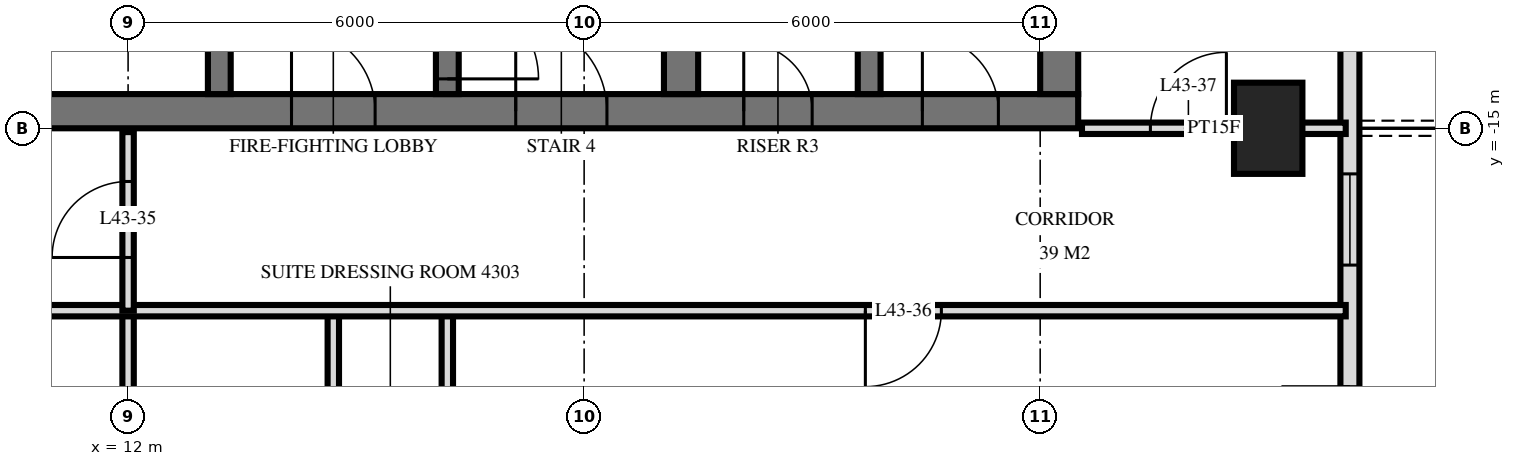
"""IFC4 building model, lengths in metres.
Left out: names, types, materials, properties, quantities, classifications, styles, units other than length and angle.
Written with IfcOpenShell. Run it as: python <this file> out.ifc"""

import sys

from ifc_helpers import new_model, si_unit, direction, frame, frame_2d, origin, origin_2d, place, context, subcontext, project, spatial, rectangle, extrude, element, fill, save


model = new_model("IFC4")
c1 = context("Model", 3, precision=1e-05, world=origin(), true_north=direction((0.0, 1.0)))
c2 = subcontext(c1, "Body", "Model", "MODEL_VIEW")
j1 = project(units=[si_unit("LENGTHUNIT", "METRE"), si_unit("PLANEANGLEUNIT", "RADIAN")], contexts=[c1])
p1 = place(None, origin())
s1 = spatial("IfcSite", under=j1, at=p1, CompositionType="ELEMENT")
p2 = place(p1, origin())
s2 = spatial("IfcBuilding", under=s1, at=p2, CompositionType="ELEMENT")
p3 = place(p2, frame((0.0, 0.0, 166.8)))
s3 = spatial("IfcBuildingStorey", under=s2, at=p3, CompositionType="ELEMENT", Elevation=166.8)
p4 = place(p3, frame((27.0, -15.0, 0.0), z_axis=(0.0, 0.0, 1.0), x_axis=(0.0, 1.0, 0.0)))
e1 = element("IfcColumn", 1, at=p4, inside=s3, PredefinedType="COLUMN", context=c2, shape_type="SweptSolid", body=[
    extrude(rectangle(XDim=1.2, YDim=0.9, at=origin_2d()), origin(), (0.0, 0.0, 1.0), 3.6),
])
p5 = place(p3, frame((10.0, -14.775, 0.0), z_axis=(0.0, 0.0, 1.0), x_axis=(1.0, 0.0, 0.0)))
e2 = element("IfcWall", 2, at=p5, inside=s3, PredefinedType="SHEAR", context=c2, shape_type="SweptSolid", body=[
    extrude(rectangle(XDim=14.5, YDim=0.45, at=frame_2d((7.25, 0.0))), origin(), (0.0, 0.0, 1.0), 3.6),
])
p6 = place(p5, frame((7.1, 0.0, 0.0)))
e3 = element("IfcOpeningElement", 3, at=p6, cuts=e2, PredefinedType="OPENING", context=c2, shape_type="SweptSolid", body=[
    extrude(rectangle(XDim=1.2, YDim=2.1, at=frame_2d((0.6, 1.05))), frame((0.0, 0.235, 0.0), z_axis=(0.0, -1.0, 0.0), x_axis=(1.0, 0.0, 0.0)), (0.0, 0.0, 1.0), 0.47),
])
p7 = place(p5, frame((4.15, 0.0, 0.0)))
e4 = element("IfcOpeningElement", 4, at=p7, cuts=e2, PredefinedType="OPENING", context=c2, shape_type="SweptSolid", body=[
    extrude(rectangle(XDim=1.1, YDim=2.1, at=frame_2d((0.55, 1.05))), frame((0.0, 0.235, 0.0), z_axis=(0.0, -1.0, 0.0), x_axis=(1.0, 0.0, 0.0)), (0.0, 0.0, 1.0), 0.47),
])
p8 = place(p5, frame((10.1, 0.0, 0.0)))
e5 = element("IfcOpeningElement", 5, at=p8, cuts=e2, PredefinedType="OPENING", context=c2, shape_type="SweptSolid", body=[
    extrude(rectangle(XDim=0.9, YDim=2.1, at=frame_2d((0.45, 1.05))), frame((0.0, 0.235, 0.0), z_axis=(0.0, -1.0, 0.0), x_axis=(1.0, 0.0, 0.0)), (0.0, 0.0, 1.0), 0.47),
])
p9 = place(p5, frame((12.45, 0.0, 0.0)))
e6 = element("IfcOpeningElement", 6, at=p9, cuts=e2, PredefinedType="OPENING", context=c2, shape_type="SweptSolid", body=[
    extrude(rectangle(XDim=1.0, YDim=2.1, at=frame_2d((0.5, 1.05))), frame((0.0, 0.235, 0.0), z_axis=(0.0, -1.0, 0.0), x_axis=(1.0, 0.0, 0.0)), (0.0, 0.0, 1.0), 0.47),
])
p10 = place(p3, frame((24.25, -14.55, 0.0), z_axis=(0.0, 0.0, 1.0), x_axis=(0.0, 1.0, 0.0)))
e7 = element("IfcWall", 7, at=p10, inside=s3, PredefinedType="SHEAR", context=c2, shape_type="SweptSolid", body=[
    extrude(rectangle(XDim=14.1, YDim=0.5, at=frame_2d((7.05, 0.0))), origin(), (0.0, 0.0, 1.0), 3.6),
])
p11 = place(p3, frame((13.2, -14.55, 0.0), z_axis=(0.0, 0.0, 1.0), x_axis=(0.0, 1.0, 0.0)))
e8 = element("IfcWall", 8, at=p11, inside=s3, PredefinedType="SHEAR", context=c2, shape_type="SweptSolid", body=[
    extrude(rectangle(XDim=5.4, YDim=0.3, at=frame_2d((2.7, 0.0))), origin(), (0.0, 0.0, 1.0), 3.6),
])
p12 = place(p11, frame((4.0, 0.0, 0.0)))
e9 = element("IfcOpeningElement", 9, at=p12, cuts=e8, PredefinedType="OPENING", context=c2, shape_type="SweptSolid", body=[
    extrude(rectangle(XDim=1.2, YDim=2.1, at=frame_2d((0.6, 1.05))), frame((0.0, 0.16, 0.0), z_axis=(0.0, -1.0, 0.0), x_axis=(1.0, 0.0, 0.0)), (0.0, 0.0, 1.0), 0.32),
])
p13 = place(p3, frame((16.2, -14.55, 0.0), z_axis=(0.0, 0.0, 1.0), x_axis=(0.0, 1.0, 0.0)))
e10 = element("IfcWall", 10, at=p13, inside=s3, PredefinedType="SHEAR", context=c2, shape_type="SweptSolid", body=[
    extrude(rectangle(XDim=5.4, YDim=0.3, at=frame_2d((2.7, 0.0))), origin(), (0.0, 0.0, 1.0), 3.6),
])
p14 = place(p13, frame((0.2, 0.0, 0.0)))
e11 = element("IfcOpeningElement", 11, at=p14, cuts=e10, PredefinedType="OPENING", context=c2, shape_type="SweptSolid", body=[
    extrude(rectangle(XDim=1.2, YDim=2.1, at=frame_2d((0.6, 1.05))), frame((0.0, 0.16, 0.0), z_axis=(0.0, -1.0, 0.0), x_axis=(1.0, 0.0, 0.0)), (0.0, 0.0, 1.0), 0.32),
])
p15 = place(p3, frame((19.275, -14.55, 0.0), z_axis=(0.0, 0.0, 1.0), x_axis=(0.0, 1.0, 0.0)))
e12 = element("IfcWall", 12, at=p15, inside=s3, PredefinedType="SHEAR", context=c2, shape_type="SweptSolid", body=[
    extrude(rectangle(XDim=5.4, YDim=0.45, at=frame_2d((2.7, 0.0))), origin(), (0.0, 0.0, 1.0), 3.6),
])
p16 = place(p3, frame((21.75, -14.55, 0.0), z_axis=(0.0, 0.0, 1.0), x_axis=(0.0, 1.0, 0.0)))
e13 = element("IfcWall", 13, at=p16, inside=s3, PredefinedType="SHEAR", context=c2, shape_type="SweptSolid", body=[
    extrude(rectangle(XDim=5.4, YDim=0.3, at=frame_2d((2.7, 0.0))), origin(), (0.0, 0.0, 1.0), 3.6),
])
p17 = place(p3, frame((28.075, -29.275, 0.0), z_axis=(0.0, 0.0, 1.0), x_axis=(0.0, 1.0, 0.0)))
e14 = element("IfcWall", 14, at=p17, inside=s3, PredefinedType="SOLIDWALL", context=c2, shape_type="SweptSolid", body=[
    extrude(rectangle(XDim=25.951, YDim=0.25, at=frame_2d((12.975, 0.0))), origin(), (0.0, 0.0, 1.0), 3.32),
])
p18 = place(p17, frame((0.575, 0.0, 0.0)))
e15 = element("IfcOpeningElement", 15, at=p18, cuts=e14, PredefinedType="OPENING", context=c2, shape_type="SweptSolid", body=[
    extrude(rectangle(XDim=1.8, YDim=2.4, at=frame_2d((0.9, 1.2))), frame((0.0, 0.135, 0.0), z_axis=(0.0, -1.0, 0.0), x_axis=(1.0, 0.0, 0.0)), (0.0, 0.0, 1.0), 0.27),
])
p19 = place(p17, frame((3.325, 0.0, 0.3)))
e16 = element("IfcOpeningElement", 16, at=p19, cuts=e14, PredefinedType="OPENING", context=c2, shape_type="SweptSolid", body=[
    extrude(rectangle(XDim=1.8, YDim=2.1, at=frame_2d((0.9, 1.05))), frame((0.0, 0.135, 0.0), z_axis=(0.0, -1.0, 0.0), x_axis=(1.0, 0.0, 0.0)), (0.0, 0.0, 1.0), 0.27),
])
p20 = place(p17, frame((9.075, 0.0, 0.0)))
e17 = element("IfcOpeningElement", 17, at=p20, cuts=e14, PredefinedType="OPENING", context=c2, shape_type="SweptSolid", body=[
    extrude(rectangle(XDim=1.8, YDim=2.4, at=frame_2d((0.9, 1.2))), frame((0.0, 0.135, 0.0), z_axis=(0.0, -1.0, 0.0), x_axis=(1.0, 0.0, 0.0)), (0.0, 0.0, 1.0), 0.27),
])
p21 = place(p17, frame((12.475, 0.0, 0.3)))
e18 = element("IfcOpeningElement", 18, at=p21, cuts=e14, PredefinedType="OPENING", context=c2, shape_type="SweptSolid", body=[
    extrude(rectangle(XDim=1.2, YDim=2.1, at=frame_2d((0.6, 1.05))), frame((0.0, 0.135, 0.0), z_axis=(0.0, -1.0, 0.0), x_axis=(1.0, 0.0, 0.0)), (0.0, 0.0, 1.0), 0.27),
])
p22 = place(p17, frame((16.625, 0.0, 0.0)))
e19 = element("IfcOpeningElement", 19, at=p22, cuts=e14, PredefinedType="OPENING", context=c2, shape_type="SweptSolid", body=[
    extrude(rectangle(XDim=1.8, YDim=2.4, at=frame_2d((0.9, 1.2))), frame((0.0, 0.135, 0.0), z_axis=(0.0, -1.0, 0.0), x_axis=(1.0, 0.0, 0.0)), (0.0, 0.0, 1.0), 0.27),
])
p23 = place(p3, frame((16.2, -21.6, 0.0), z_axis=(0.0, 0.0, 1.0), x_axis=(0.0, 1.0, 0.0)))
e20 = element("IfcWall", 20, at=p23, inside=s3, PredefinedType="PARTITIONING", context=c2, shape_type="SweptSolid", body=[
    extrude(rectangle(XDim=4.2, YDim=0.15, at=frame_2d((2.1, 0.0))), origin(), (0.0, 0.0, 1.0), 3.32),
])
p24 = place(p23, frame((1.65, 0.0, 0.0)))
e21 = element("IfcOpeningElement", 21, at=p24, cuts=e20, PredefinedType="OPENING", context=c2, shape_type="SweptSolid", body=[
    extrude(rectangle(XDim=0.9, YDim=2.1, at=frame_2d((0.45, 1.05))), frame((0.0, 0.085, 0.0), z_axis=(0.0, -1.0, 0.0), x_axis=(1.0, 0.0, 0.0)), (0.0, 0.0, 1.0), 0.17),
])
p25 = place(p3, frame((14.7, -21.6, 0.0), z_axis=(0.0, 0.0, 1.0), x_axis=(0.0, 1.0, 0.0)))
e22 = element("IfcWall", 22, at=p25, inside=s3, PredefinedType="PARTITIONING", context=c2, shape_type="SweptSolid", body=[
    extrude(rectangle(XDim=4.2, YDim=0.15, at=frame_2d((2.1, 0.0))), origin(), (0.0, 0.0, 1.0), 3.32),
])
p26 = place(p3, frame((12.0, -17.4, 0.0), z_axis=(0.0, 0.0, 1.0), x_axis=(0.0, 1.0, 0.0)))
e23 = element("IfcWall", 23, at=p26, inside=s3, PredefinedType="PARTITIONING", context=c2, shape_type="SweptSolid", body=[
    extrude(rectangle(XDim=2.35, YDim=0.15, at=frame_2d((1.175, 0.0))), origin(), (0.0, 0.0, 1.0), 3.32),
])
p27 = place(p26, frame((0.7, 0.0, 0.0)))
e24 = element("IfcOpeningElement", 24, at=p27, cuts=e23, PredefinedType="OPENING", context=c2, shape_type="SweptSolid", body=[
    extrude(rectangle(XDim=1.0, YDim=2.1, at=frame_2d((0.5, 1.05))), frame((0.0, 0.085, 0.0), z_axis=(0.0, -1.0, 0.0), x_axis=(1.0, 0.0, 0.0)), (0.0, 0.0, 1.0), 0.17),
])
p28 = place(p3, frame((12.0, -33.62, 0.0), z_axis=(0.0, 0.0, 1.0), x_axis=(0.0, 1.0, 0.0)))
e25 = element("IfcWall", 25, at=p28, inside=s3, PredefinedType="PARTITIONING", context=c2, shape_type="SweptSolid", body=[
    extrude(rectangle(XDim=16.22, YDim=0.15, at=frame_2d((8.11, 0.0))), origin(), (0.0, 0.0, 1.0), 3.32),
])
p29 = place(p3, frame((-28.02, -17.4, 0.0), z_axis=(0.0, 0.0, 1.0), x_axis=(1.0, 0.0, 0.0)))
e26 = element("IfcWall", 26, at=p29, inside=s3, PredefinedType="PARTITIONING", context=c2, shape_type="SweptSolid", body=[
    extrude(rectangle(XDim=56.04, YDim=0.15, at=frame_2d((28.02, 0.0))), origin(), (0.0, 0.0, 1.0), 3.32),
])
p30 = place(p29, frame((10.42, 0.0, 0.0)))
e27 = element("IfcOpeningElement", 27, at=p30, cuts=e26, PredefinedType="OPENING", context=c2, shape_type="SweptSolid", body=[
    extrude(rectangle(XDim=1.0, YDim=2.1, at=frame_2d((0.5, 1.05))), frame((0.0, 0.085, 0.0), z_axis=(0.0, -1.0, 0.0), x_axis=(1.0, 0.0, 0.0)), (0.0, 0.0, 1.0), 0.17),
])
p31 = place(p29, frame((2.32, 0.0, 0.0)))
e28 = element("IfcOpeningElement", 28, at=p31, cuts=e26, PredefinedType="OPENING", context=c2, shape_type="SweptSolid", body=[
    extrude(rectangle(XDim=1.0, YDim=2.1, at=frame_2d((0.5, 1.05))), frame((0.0, 0.085, 0.0), z_axis=(0.0, -1.0, 0.0), x_axis=(1.0, 0.0, 0.0)), (0.0, 0.0, 1.0), 0.17),
])
p32 = place(p29, frame((49.72, 0.0, 0.0)))
e29 = element("IfcOpeningElement", 29, at=p32, cuts=e26, PredefinedType="OPENING", context=c2, shape_type="SweptSolid", body=[
    extrude(rectangle(XDim=1.0, YDim=2.1, at=frame_2d((0.5, 1.05))), frame((0.0, 0.085, 0.0), z_axis=(0.0, -1.0, 0.0), x_axis=(1.0, 0.0, 0.0)), (0.0, 0.0, 1.0), 0.17),
])
p33 = place(p29, frame((23.02, 0.0, 0.0)))
e30 = element("IfcOpeningElement", 30, at=p33, cuts=e26, PredefinedType="OPENING", context=c2, shape_type="SweptSolid", body=[
    extrude(rectangle(XDim=1.0, YDim=2.1, at=frame_2d((0.5, 1.05))), frame((0.0, 0.085, 0.0), z_axis=(0.0, -1.0, 0.0), x_axis=(1.0, 0.0, 0.0)), (0.0, 0.0, 1.0), 0.17),
])
p34 = place(p29, frame((35.02, 0.0, 0.0)))
e31 = element("IfcOpeningElement", 31, at=p34, cuts=e26, PredefinedType="OPENING", context=c2, shape_type="SweptSolid", body=[
    extrude(rectangle(XDim=1.0, YDim=2.1, at=frame_2d((0.5, 1.05))), frame((0.0, 0.085, 0.0), z_axis=(0.0, -1.0, 0.0), x_axis=(1.0, 0.0, 0.0)), (0.0, 0.0, 1.0), 0.17),
])
p35 = place(p3, frame((24.55, -15.0, 0.0), z_axis=(0.0, 0.0, 1.0), x_axis=(1.0, 0.0, 0.0)))
e32 = element("IfcWall", 32, at=p35, inside=s3, PredefinedType="PARTITIONING", context=c2, shape_type="SweptSolid", body=[
    extrude(rectangle(XDim=3.47, YDim=0.15, at=frame_2d((1.735, 0.0))), origin(), (0.0, 0.0, 1.0), 3.32),
])
p36 = place(p35, frame((0.9, 0.0, 0.0)))
e33 = element("IfcOpeningElement", 33, at=p36, cuts=e32, PredefinedType="OPENING", context=c2, shape_type="SweptSolid", body=[
    extrude(rectangle(XDim=1.0, YDim=2.1, at=frame_2d((0.5, 1.05))), frame((0.0, 0.085, 0.0), z_axis=(0.0, -1.0, 0.0), x_axis=(1.0, 0.0, 0.0)), (0.0, 0.0, 1.0), 0.17),
])
p37 = place(p21, origin())
e34 = element("IfcWindow", 34, at=p37, inside=s3, PartitioningType="SINGLE_PANEL", PredefinedType="WINDOW", context=c2, shape_type="SweptSolid", body=[
    extrude(rectangle(XDim=1.2, YDim=2.1, at=frame_2d((0.6, 1.05))), frame((0.0, 0.03, 0.0), z_axis=(0.0, -1.0, 0.0), x_axis=(1.0, 0.0, 0.0)), (0.0, 0.0, 1.0), 0.06),
])
fill(e18, e34)
p38 = place(p6, origin())
e35 = element("IfcDoor", 35, at=p38, inside=s3, OperationType="SINGLE_SWING_RIGHT", PredefinedType="DOOR", context=c2, shape_type="SweptSolid", body=[
    extrude(rectangle(XDim=1.2, YDim=2.1, at=frame_2d((0.6, 1.05))), frame((0.0, 0.025, 0.0), z_axis=(0.0, -1.0, 0.0), x_axis=(1.0, 0.0, 0.0)), (0.0, 0.0, 1.0), 0.05),
])
fill(e3, e35)
p39 = place(p7, origin())
e36 = element("IfcDoor", 36, at=p39, inside=s3, OperationType="SINGLE_SWING_RIGHT", PredefinedType="DOOR", context=c2, shape_type="SweptSolid", body=[
    extrude(rectangle(XDim=1.1, YDim=2.1, at=frame_2d((0.55, 1.05))), frame((0.0, 0.025, 0.0), z_axis=(0.0, -1.0, 0.0), x_axis=(1.0, 0.0, 0.0)), (0.0, 0.0, 1.0), 0.05),
])
fill(e4, e36)
p40 = place(p8, origin())
e37 = element("IfcDoor", 37, at=p40, inside=s3, OperationType="SINGLE_SWING_RIGHT", PredefinedType="DOOR", context=c2, shape_type="SweptSolid", body=[
    extrude(rectangle(XDim=0.9, YDim=2.1, at=frame_2d((0.45, 1.05))), frame((0.0, 0.025, 0.0), z_axis=(0.0, -1.0, 0.0), x_axis=(1.0, 0.0, 0.0)), (0.0, 0.0, 1.0), 0.05),
])
fill(e5, e37)
p41 = place(p9, origin())
e38 = element("IfcDoor", 38, at=p41, inside=s3, OperationType="SINGLE_SWING_RIGHT", PredefinedType="DOOR", context=c2, shape_type="SweptSolid", body=[
    extrude(rectangle(XDim=1.0, YDim=2.1, at=frame_2d((0.5, 1.05))), frame((0.0, 0.025, 0.0), z_axis=(0.0, -1.0, 0.0), x_axis=(1.0, 0.0, 0.0)), (0.0, 0.0, 1.0), 0.05),
])
fill(e6, e38)
p42 = place(p14, frame((0.6, 0.0, 0.0), z_axis=(0.0, 0.0, 1.0), x_axis=(-1.0, 0.0, 0.0)))
e39 = element("IfcDoor", 39, at=p42, inside=s3, OperationType="SINGLE_SWING_LEFT", PredefinedType="DOOR", context=c2, shape_type="SweptSolid", body=[
    extrude(rectangle(XDim=1.2, YDim=2.1, at=frame_2d((0.0, 1.05))), frame((0.0, -0.025, 0.0), z_axis=(0.0, 1.0, 0.0), x_axis=(-1.0, 0.0, 0.0)), (0.0, 0.0, 1.0), 0.05),
])
fill(e11, e39)
p43 = place(p27, origin())
e40 = element("IfcDoor", 40, at=p43, inside=s3, OperationType="SINGLE_SWING_RIGHT", PredefinedType="DOOR", context=c2, shape_type="SweptSolid", body=[
    extrude(rectangle(XDim=1.0, YDim=2.1, at=frame_2d((0.5, 1.05))), frame((0.0, 0.025, 0.0), z_axis=(0.0, -1.0, 0.0), x_axis=(1.0, 0.0, 0.0)), (0.0, 0.0, 1.0), 0.05),
])
fill(e24, e40)
p44 = place(p32, frame((0.5, 0.0, 0.0), z_axis=(0.0, 0.0, 1.0), x_axis=(-1.0, 0.0, 0.0)))
e41 = element("IfcDoor", 41, at=p44, inside=s3, OperationType="SINGLE_SWING_LEFT", PredefinedType="DOOR", context=c2, shape_type="SweptSolid", body=[
    extrude(rectangle(XDim=1.0, YDim=2.1, at=frame_2d((0.0, 1.05))), frame((0.0, -0.025, 0.0), z_axis=(0.0, 1.0, 0.0), x_axis=(-1.0, 0.0, 0.0)), (0.0, 0.0, 1.0), 0.05),
])
fill(e29, e41)
p45 = place(p36, origin())
e42 = element("IfcDoor", 42, at=p45, inside=s3, OperationType="SINGLE_SWING_LEFT", PredefinedType="DOOR", context=c2, shape_type="SweptSolid", body=[
    extrude(rectangle(XDim=1.0, YDim=2.1, at=frame_2d((0.5, 1.05))), frame((0.0, 0.025, 0.0), z_axis=(0.0, -1.0, 0.0), x_axis=(1.0, 0.0, 0.0)), (0.0, 0.0, 1.0), 0.05),
])
fill(e33, e42)
save(model, sys.argv[1])
